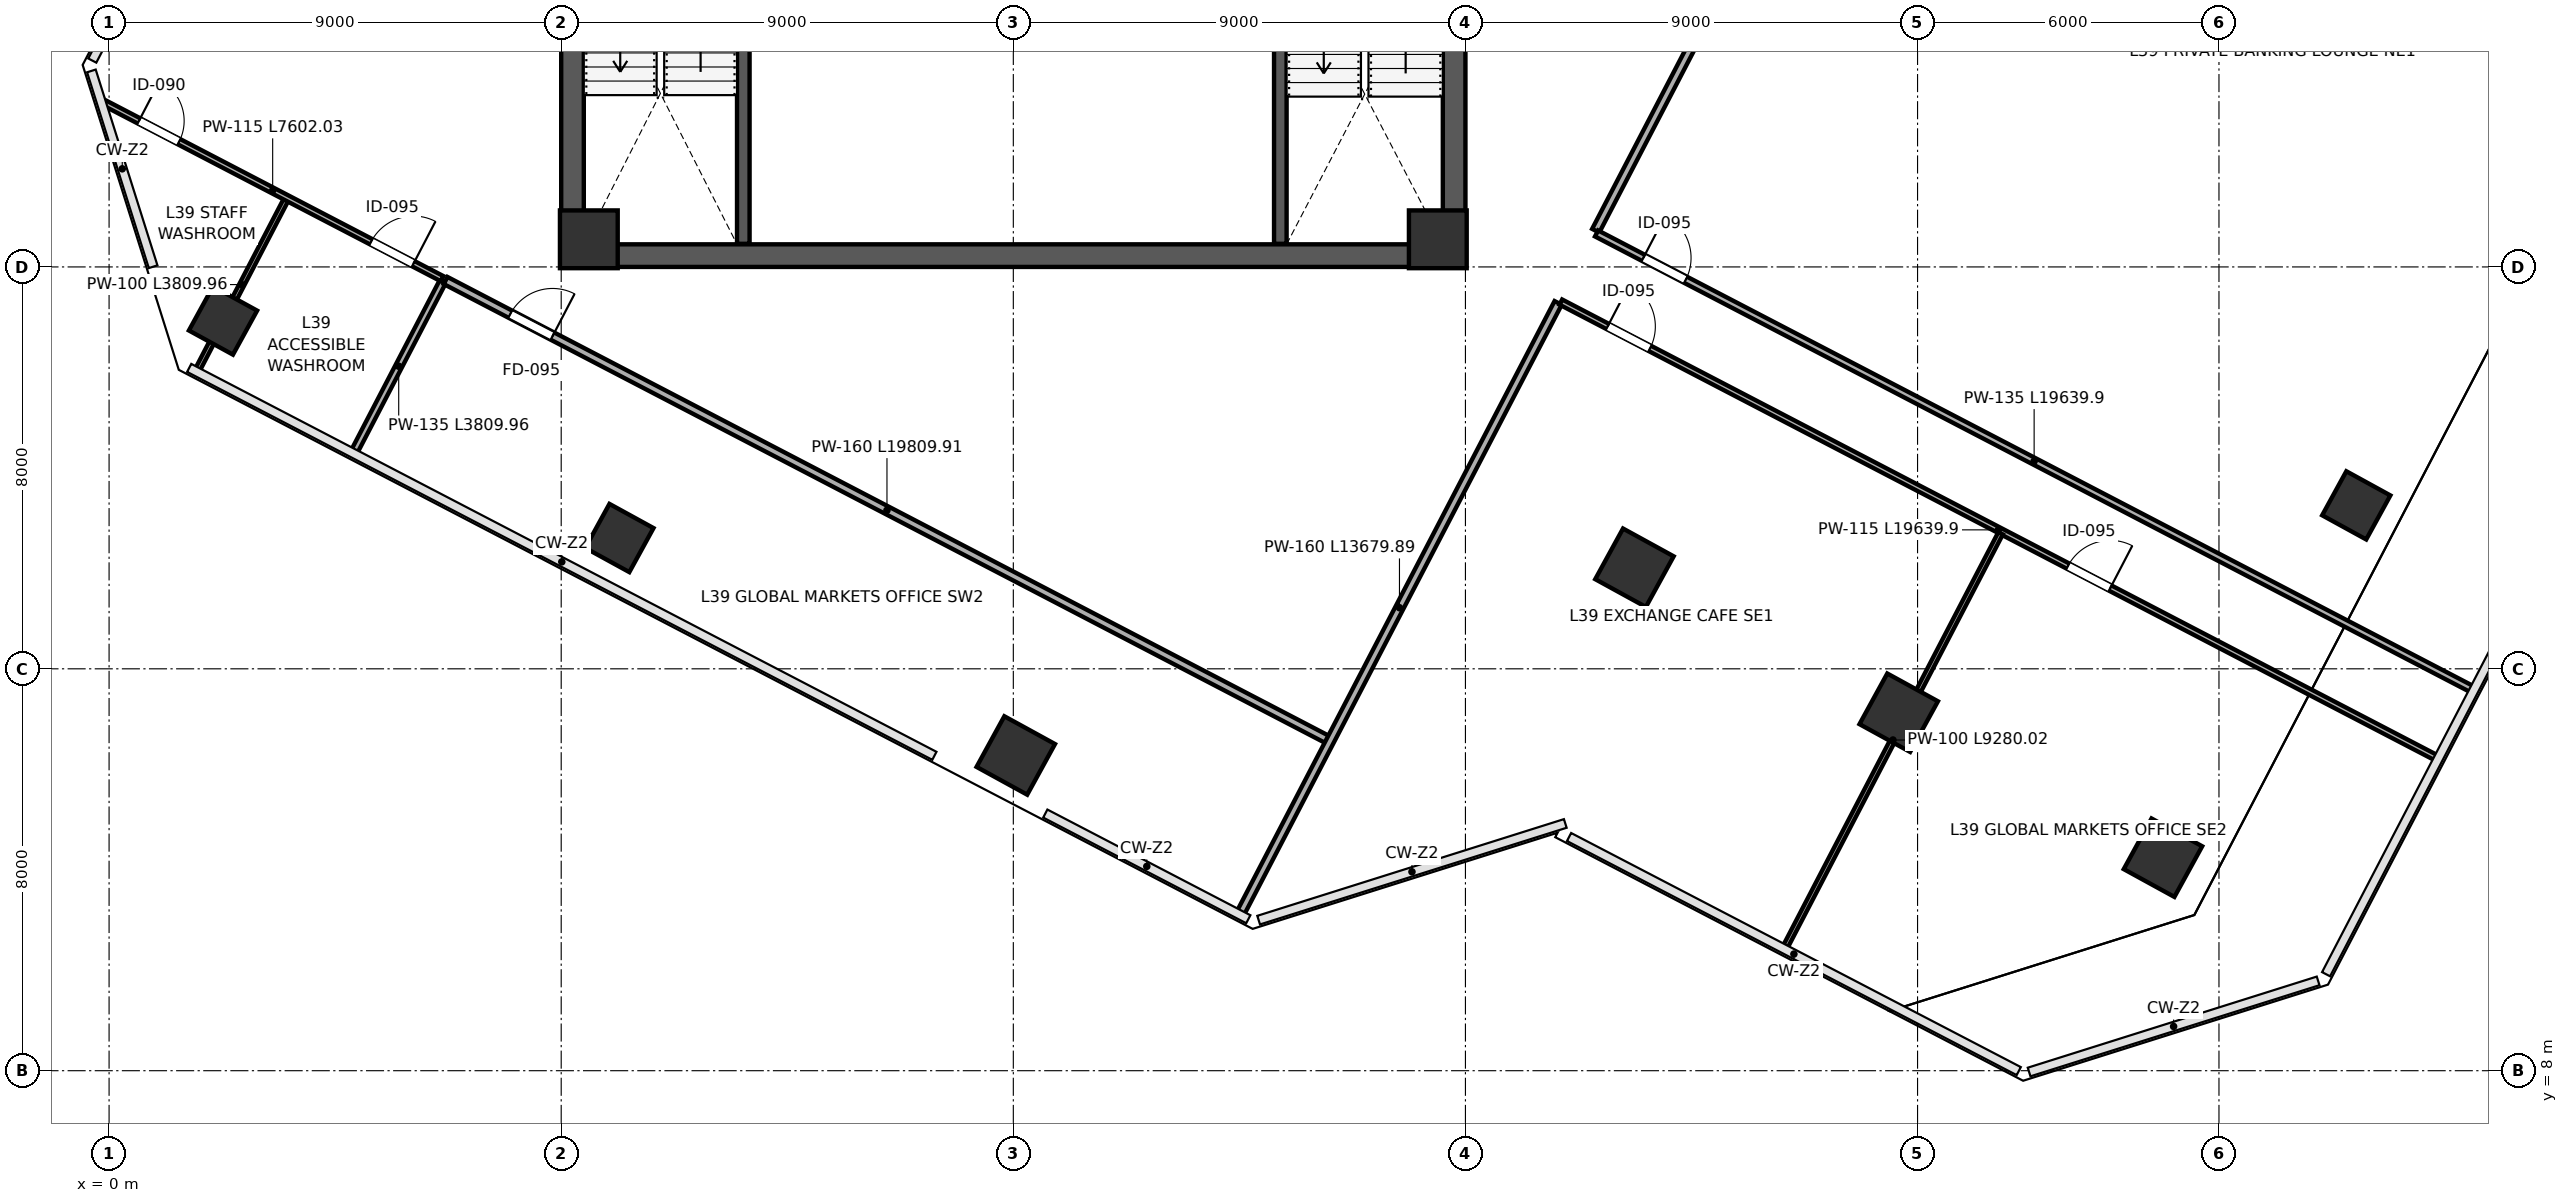
"""IFC4 building model, lengths in metres.
Left out: names, types, materials, properties, quantities, classifications, styles, units other than length and angle.
Written with IfcOpenShell. Run it as: python <this file> out.ifc"""

import sys

from ifc_helpers import new_model, si_unit, direction, frame, frame_2d, origin, origin_2d, place, context, subcontext, project, spatial, rectangle, extrude, clip, halfspace, source, transform, mapped, element, fill, save


model = new_model("IFC4")
c1 = context("Model", 3, precision=1e-05, world=origin(), true_north=direction((0.0, 1.0)))
c2 = subcontext(c1, "Body", "Model", "MODEL_VIEW")
j1 = project(units=[si_unit("LENGTHUNIT", "METRE"), si_unit("PLANEANGLEUNIT", "RADIAN")], contexts=[c1])
p1 = place(None, origin())
s1 = spatial("IfcSite", under=j1, at=p1, CompositionType="ELEMENT")
p2 = place(p1, origin())
s2 = spatial("IfcBuilding", under=s1, at=p2, CompositionType="ELEMENT")
p3 = place(p2, frame((0.0, 0.0, 175.0)))
s3 = spatial("IfcBuildingStorey", under=s2, at=p3, CompositionType="ELEMENT", Elevation=175.0)
m1 = source(origin(), c2, "Body", "SweptSolid", [
    extrude(rectangle(XDim=1.15, YDim=1.15, at=origin_2d()), origin(), (0.0, 0.0, 1.0), 4.198),
])
for number, where, z_axis, x_axis in (
    (1, (9.55, 24.55, 0.001), (0.0, 0.0, 1.0), (1.0, 0.0, 0.0)),
    (2, (26.45, 24.55, 0.001), (0.0, 0.0, 1.0), (1.0, 0.0, 0.0)),
):
    element("IfcColumn", number, at=place(p3, frame(where, z_axis=z_axis, x_axis=x_axis)), inside=s3, PredefinedType="COLUMN", context=c2, shape_type="MappedRepresentation", body=[
        mapped(m1, transform((0.0, 0.0, 0.0), scale=1.0)),
    ])
p4 = place(p3, frame((2.268, 22.933, 0.0), z_axis=(-0.045702324367, 0.099840223143, 0.993953332602), x_axis=(0.996162629473, -0.069790249582, 0.052814171435)))
e3 = element("IfcColumn", 3, at=p4, inside=s3, PredefinedType="COLUMN", context=c2, shape_type="Clipping", body=[
    clip(clip(extrude(rectangle(XDim=1.0, YDim=1.0, at=origin_2d()), origin(), (0.0, 0.0, 1.0), 4.226), halfspace(frame((0.0, 0.0, 0.076), z_axis=(0.0, 0.0, -1.0), x_axis=(1.0, 0.0, 0.0)), False)), halfspace(frame((0.0, 0.0, 4.15), z_axis=(0.0, 0.0, 1.0), x_axis=(1.0, 0.0, 0.0)), False)),
])
p5 = place(p3, frame((10.158, 18.604, 0.0), z_axis=(-0.068656550624, 0.059452173264, 0.995867319049), x_axis=(0.936025250546, 0.349211237631, 0.043683427664)))
e4 = element("IfcColumn", 4, at=p5, inside=s3, PredefinedType="COLUMN", context=c2, shape_type="Clipping", body=[
    clip(clip(extrude(rectangle(XDim=1.0, YDim=1.0, at=origin_2d()), origin(), (0.0, 0.0, 1.0), 4.217), halfspace(frame((0.0, 0.0, 0.062), z_axis=(0.0, 0.0, -1.0), x_axis=(1.0, 0.0, 0.0)), False)), halfspace(frame((0.0, 0.0, 4.155), z_axis=(0.0, 0.0, 1.0), x_axis=(1.0, 0.0, 0.0)), False)),
])
p6 = place(p3, frame((18.049, 14.275, 0.0), z_axis=(-0.091500617733, 0.018867300051, 0.995626266198), x_axis=(0.646073035963, 0.761951658232, 0.044936652286)))
e5 = element("IfcColumn", 5, at=p6, inside=s3, PredefinedType="COLUMN", context=c2, shape_type="Clipping", body=[
    clip(clip(extrude(rectangle(XDim=1.15, YDim=1.15, at=origin_2d()), origin(), (0.0, 0.0, 1.0), 4.219), halfspace(frame((0.0, 0.0, 0.074), z_axis=(0.0, 0.0, -1.0), x_axis=(1.0, 0.0, 0.0)), False)), halfspace(frame((0.0, 0.0, 4.145), z_axis=(0.0, 0.0, 1.0), x_axis=(1.0, 0.0, 0.0)), False)),
])
p7 = place(p3, frame((30.365, 18.012, 0.0), z_axis=(-0.072857964063, -0.045058422926, 0.996323971204), x_axis=(-0.05356759986, 0.997713755824, 0.041204049376)))
e6 = element("IfcColumn", 6, at=p7, inside=s3, PredefinedType="COLUMN", context=c2, shape_type="Clipping", body=[
    clip(clip(extrude(rectangle(XDim=1.15, YDim=1.15, at=origin_2d()), origin(), (0.0, 0.0, 1.0), 4.215), halfspace(frame((0.0, 0.0, 0.068), z_axis=(0.0, 0.0, -1.0), x_axis=(1.0, 0.0, 0.0)), False)), halfspace(frame((0.0, 0.0, 4.147), z_axis=(0.0, 0.0, 1.0), x_axis=(1.0, 0.0, 0.0)), False)),
])
p8 = place(p3, frame((35.625, 15.126, 0.0), z_axis=(-0.08790022673, -0.071960369583, 0.993526675711), x_axis=(-0.185602299854, 0.98110461781, 0.054639868245)))
e7 = element("IfcColumn", 7, at=p8, inside=s3, PredefinedType="COLUMN", context=c2, shape_type="Clipping", body=[
    clip(clip(extrude(rectangle(XDim=1.15, YDim=1.15, at=origin_2d()), origin(), (0.0, 0.0, 1.0), 4.227), halfspace(frame((0.0, 0.0, 0.09), z_axis=(0.0, 0.0, -1.0), x_axis=(1.0, 0.0, 0.0)), False)), halfspace(frame((0.0, 0.0, 4.137), z_axis=(0.0, 0.0, 1.0), x_axis=(1.0, 0.0, 0.0)), False)),
])
p9 = place(p3, frame((40.885, 12.24, 0.0), z_axis=(-0.102647428215, -0.098562244693, 0.989822706045), x_axis=(-0.263814321847, 0.962141844179, 0.068447609656)))
e8 = element("IfcColumn", 8, at=p9, inside=s3, PredefinedType="COLUMN", context=c2, shape_type="Clipping", body=[
    clip(clip(extrude(rectangle(XDim=1.15, YDim=1.15, at=origin_2d()), origin(), (0.0, 0.0, 1.0), 4.243), halfspace(frame((0.0, 0.0, 0.113), z_axis=(0.0, 0.0, -1.0), x_axis=(1.0, 0.0, 0.0)), False)), halfspace(frame((0.0, 0.0, 4.13), z_axis=(0.0, 0.0, 1.0), x_axis=(1.0, 0.0, 0.0)), False)),
])
p10 = place(p3, frame((44.733, 19.254, 0.0), z_axis=(-0.066915065286, -0.118857740749, 0.99065393125), x_axis=(-0.530216325585, 0.845320310072, 0.065606565695)))
e9 = element("IfcColumn", 9, at=p10, inside=s3, PredefinedType="COLUMN", context=c2, shape_type="Clipping", body=[
    clip(clip(extrude(rectangle(XDim=1.0, YDim=1.0, at=origin_2d()), origin(), (0.0, 0.0, 1.0), 4.24), halfspace(frame((0.0, 0.0, 0.094), z_axis=(0.0, 0.0, -1.0), x_axis=(1.0, 0.0, 0.0)), False)), halfspace(frame((0.0, 0.0, 4.145), z_axis=(0.0, 0.0, 1.0), x_axis=(1.0, 0.0, 0.0)), False)),
])
p11 = place(p3, frame((9.225, 24.45, 0.0), z_axis=(0.0, 0.0, 1.0), x_axis=(0.0, 1.0, 0.0)))
e10 = element("IfcWall", 10, at=p11, inside=s3, PredefinedType="SHEAR", context=c2, shape_type="SweptSolid", body=[
    extrude(rectangle(XDim=15.1, YDim=0.45, at=frame_2d((7.55, 0.0))), origin(), (0.0, 0.0, 1.0), 3.96),
])
p12 = place(p3, frame((26.775, 24.45, 0.0), z_axis=(0.0, 0.0, 1.0), x_axis=(0.0, 1.0, 0.0)))
e11 = element("IfcWall", 11, at=p12, inside=s3, PredefinedType="SHEAR", context=c2, shape_type="SweptSolid", body=[
    extrude(rectangle(XDim=15.1, YDim=0.45, at=frame_2d((7.55, 0.0))), origin(), (0.0, 0.0, 1.0), 3.96),
])
p13 = place(p12, frame((8.6, 0.0, 0.0)))
e12 = element("IfcOpeningElement", 12, at=p13, cuts=e11, PredefinedType="OPENING", context=c2, shape_type="SweptSolid", body=[
    extrude(rectangle(XDim=1.15, YDim=2.2, at=frame_2d((0.575, 1.1))), frame((0.0, 0.235, 0.0), z_axis=(0.0, -1.0, 0.0), x_axis=(1.0, 0.0, 0.0)), (0.0, 0.0, 1.0), 0.47),
])
p14 = place(p3, frame((9.0, 24.225, 0.0), z_axis=(0.0, 0.0, 1.0), x_axis=(1.0, 0.0, 0.0)))
e13 = element("IfcWall", 13, at=p14, inside=s3, PredefinedType="SHEAR", context=c2, shape_type="SweptSolid", body=[
    extrude(rectangle(XDim=18.0, YDim=0.45, at=frame_2d((9.0, 0.0))), origin(), (0.0, 0.0, 1.0), 3.96),
])
p15 = place(p3, frame((12.625, 24.46, 0.0), z_axis=(0.0, 0.0, 1.0), x_axis=(0.0, 1.0, 0.0)))
e14 = element("IfcWall", 14, at=p15, inside=s3, PredefinedType="SHEAR", context=c2, shape_type="SweptSolid", body=[
    extrude(rectangle(XDim=7.49, YDim=0.25, at=frame_2d((3.745, 0.0))), origin(), (0.0, 0.0, 1.0), 3.96),
])
p16 = place(p15, frame((5.85, 0.0, 0.0)))
e15 = element("IfcOpeningElement", 15, at=p16, cuts=e14, PredefinedType="OPENING", context=c2, shape_type="SweptSolid", body=[
    extrude(rectangle(XDim=1.15, YDim=2.2, at=frame_2d((0.575, 1.1))), frame((0.0, 0.135, 0.0), z_axis=(0.0, -1.0, 0.0), x_axis=(1.0, 0.0, 0.0)), (0.0, 0.0, 1.0), 0.27),
])
p17 = place(p3, frame((23.315, 24.46, 0.0), z_axis=(0.0, 0.0, 1.0), x_axis=(0.0, 1.0, 0.0)))
e16 = element("IfcWall", 16, at=p17, inside=s3, PredefinedType="SHEAR", context=c2, shape_type="SweptSolid", body=[
    extrude(rectangle(XDim=7.49, YDim=0.25, at=frame_2d((3.745, 0.0))), origin(), (0.0, 0.0, 1.0), 3.96),
])
p18 = place(p3, frame((1.763, 21.959, 0.0), z_axis=(0.0, 0.0, 1.0), x_axis=(0.461738042158, 0.887016336053, 0.0)))
e17 = element("IfcWall", 17, at=p18, inside=s3, PredefinedType="PARTITIONING", context=c2, shape_type="SweptSolid", body=[
    extrude(rectangle(XDim=3.81, YDim=0.1, at=frame_2d((1.905, 0.0))), origin(), (0.0, 0.0, 1.0), 3.195),
])
p19 = place(p3, frame((4.886, 20.333, 0.0), z_axis=(0.0, 0.0, 1.0), x_axis=(0.461764287366, 0.887002673566, 0.0)))
e18 = element("IfcWall", 18, at=p19, inside=s3, PredefinedType="PARTITIONING", context=c2, shape_type="SweptSolid", body=[
    extrude(rectangle(XDim=3.81, YDim=0.135, at=frame_2d((1.905, 0.0))), origin(), (0.0, 0.0, 1.0), 3.195),
])
p20 = place(p3, frame((-0.115, 27.277, 0.0), z_axis=(0.0, 0.0, 1.0), x_axis=(0.887004800346, -0.461760202012, 0.0)))
e19 = element("IfcWall", 19, at=p20, inside=s3, PredefinedType="PARTITIONING", context=c2, shape_type="SweptSolid", body=[
    extrude(rectangle(XDim=7.602, YDim=0.115, at=frame_2d((3.801, 0.0))), origin(), (0.0, 0.0, 1.0), 3.96),
])
p21 = place(p20, frame((0.8, 0.0, 0.0)))
e20 = element("IfcOpeningElement", 20, at=p21, cuts=e19, PredefinedType="OPENING", context=c2, shape_type="SweptSolid", body=[
    extrude(rectangle(XDim=0.9, YDim=2.15, at=frame_2d((0.45, 1.075))), frame((0.0, 0.067, 0.0), z_axis=(0.0, -1.0, 0.0), x_axis=(1.0, 0.0, 0.0)), (0.0, 0.0, 1.0), 0.135),
])
p22 = place(p20, frame((6.01, 0.0, 0.0)))
e21 = element("IfcOpeningElement", 21, at=p22, cuts=e19, PredefinedType="OPENING", context=c2, shape_type="SweptSolid", body=[
    extrude(rectangle(XDim=0.95, YDim=2.15, at=frame_2d((0.475, 1.075))), frame((0.0, 0.067, 0.0), z_axis=(0.0, -1.0, 0.0), x_axis=(1.0, 0.0, 0.0)), (0.0, 0.0, 1.0), 0.135),
])
p23 = place(p3, frame((6.699, 23.73, 0.0), z_axis=(0.0, 0.0, 1.0), x_axis=(0.887009683963, -0.46175082085, 0.0)))
e22 = element("IfcWall", 22, at=p23, inside=s3, PredefinedType="PARTITIONING", context=c2, shape_type="SweptSolid", body=[
    extrude(rectangle(XDim=19.81, YDim=0.16, at=frame_2d((9.905, 0.0))), origin(), (0.0, 0.0, 1.0), 3.96),
])
p24 = place(p23, frame((1.45, 0.0, 0.0)))
e23 = element("IfcOpeningElement", 23, at=p24, cuts=e22, PredefinedType="OPENING", context=c2, shape_type="SweptSolid", body=[
    extrude(rectangle(XDim=0.95, YDim=2.15, at=frame_2d((0.475, 1.075))), frame((0.0, 0.09, 0.0), z_axis=(0.0, -1.0, 0.0), x_axis=(1.0, 0.0, 0.0)), (0.0, 0.0, 1.0), 0.18),
])
p25 = place(p3, frame((29.593, 24.72, 0.0), z_axis=(0.0, 0.0, 1.0), x_axis=(0.461745249096, 0.88701258443, 0.0)))
e24 = element("IfcWall", 24, at=p25, inside=s3, PredefinedType="PARTITIONING", context=c2, shape_type="SweptSolid", body=[
    extrude(rectangle(XDim=18.74, YDim=0.16, at=frame_2d((9.37, 0.0))), origin(), (0.0, 0.0, 1.0), 3.195),
])
p26 = place(p3, frame((22.528, 11.149, 0.0), z_axis=(0.0, 0.0, 1.0), x_axis=(0.461766825398, 0.887001352289, 0.0)))
e25 = element("IfcWall", 25, at=p26, inside=s3, PredefinedType="PARTITIONING", context=c2, shape_type="SweptSolid", body=[
    extrude(rectangle(XDim=13.68, YDim=0.16, at=frame_2d((6.84, 0.0))), origin(), (0.0, 0.0, 1.0), 3.96),
])
p27 = place(p3, frame((29.61, 24.667, 0.0), z_axis=(0.0, 0.0, 1.0), x_axis=(0.887013798673, -0.461742916527, 0.0)))
e26 = element("IfcWall", 26, at=p27, inside=s3, PredefinedType="PARTITIONING", context=c2, shape_type="SweptSolid", body=[
    extrude(rectangle(XDim=19.64, YDim=0.135, at=frame_2d((9.82, 0.0))), origin(), (0.0, 0.0, 1.0), 3.96),
])
p28 = place(p27, frame((1.05, 0.0, 0.0)))
e27 = element("IfcOpeningElement", 27, at=p28, cuts=e26, PredefinedType="OPENING", context=c2, shape_type="SweptSolid", body=[
    extrude(rectangle(XDim=0.95, YDim=2.15, at=frame_2d((0.475, 1.075))), frame((0.0, 0.078, 0.0), z_axis=(0.0, -1.0, 0.0), x_axis=(1.0, 0.0, 0.0)), (0.0, 0.0, 1.0), 0.155),
])
p29 = place(p3, frame((28.899, 23.301, 0.0), z_axis=(0.0, 0.0, 1.0), x_axis=(0.887006056854, -0.461757788353, 0.0)))
e28 = element("IfcWall", 28, at=p29, inside=s3, PredefinedType="PARTITIONING", context=c2, shape_type="SweptSolid", body=[
    extrude(rectangle(XDim=19.64, YDim=0.115, at=frame_2d((9.82, 0.0))), origin(), (0.0, 0.0, 1.0), 3.96),
])
p30 = place(p29, frame((1.05, 0.0, 0.0)))
e29 = element("IfcOpeningElement", 29, at=p30, cuts=e28, PredefinedType="OPENING", context=c2, shape_type="SweptSolid", body=[
    extrude(rectangle(XDim=0.95, YDim=2.15, at=frame_2d((0.475, 1.075))), frame((0.0, 0.067, 0.0), z_axis=(0.0, -1.0, 0.0), x_axis=(1.0, 0.0, 0.0)), (0.0, 0.0, 1.0), 0.135),
])
p31 = place(p29, frame((11.38, 0.0, 0.0)))
e30 = element("IfcOpeningElement", 30, at=p31, cuts=e28, PredefinedType="OPENING", context=c2, shape_type="SweptSolid", body=[
    extrude(rectangle(XDim=0.95, YDim=2.15, at=frame_2d((0.475, 1.075))), frame((0.0, 0.067, 0.0), z_axis=(0.0, -1.0, 0.0), x_axis=(1.0, 0.0, 0.0)), (0.0, 0.0, 1.0), 0.135),
])
p32 = place(p3, frame((33.368, 10.467, 0.0), z_axis=(0.0, 0.0, 1.0), x_axis=(0.461728758034, 0.887021168859, 0.0)))
e31 = element("IfcWall", 31, at=p32, inside=s3, PredefinedType="PARTITIONING", context=c2, shape_type="SweptSolid", body=[
    extrude(rectangle(XDim=9.28, YDim=0.1, at=frame_2d((4.64, 0.0))), origin(), (0.0, 0.0, 1.0), 3.96),
])
m2 = source(origin(), c2, "Body", "SweptSolid", [
    extrude(rectangle(XDim=0.9, YDim=2.15, at=frame_2d((0.45, 1.075))), frame((0.0, 0.025, 0.0), z_axis=(0.0, -1.0, 0.0), x_axis=(1.0, 0.0, 0.0)), (0.0, 0.0, 1.0), 0.05),
])
p33 = place(p21, origin())
e32 = element("IfcDoor", 32, at=p33, inside=s3, OperationType="SINGLE_SWING_LEFT", PredefinedType="DOOR", context=c2, shape_type="MappedRepresentation", body=[
    mapped(m2, transform((0.0, 0.0, 0.0), scale=1.0)),
])
fill(e20, e32)
m3 = source(origin(), c2, "Body", "SweptSolid", [
    extrude(rectangle(XDim=0.95, YDim=2.15, at=frame_2d((0.475, 1.075))), frame((0.0, 0.025, 0.0), z_axis=(0.0, -1.0, 0.0), x_axis=(1.0, 0.0, 0.0)), (0.0, 0.0, 1.0), 0.05),
])
p34 = place(p22, origin())
e33 = element("IfcDoor", 33, at=p34, inside=s3, OperationType="SINGLE_SWING_RIGHT", PredefinedType="DOOR", context=c2, shape_type="MappedRepresentation", body=[
    mapped(m3, transform((0.0, 0.0, 0.0), scale=1.0)),
])
fill(e21, e33)
m4 = source(origin(), c2, "Body", "SweptSolid", [
    extrude(rectangle(XDim=0.95, YDim=2.15, at=frame_2d((0.475, 1.075))), frame((0.0, 0.025, 0.0), z_axis=(0.0, -1.0, 0.0), x_axis=(1.0, 0.0, 0.0)), (0.0, 0.0, 1.0), 0.05),
])
p35 = place(p24, origin())
e34 = element("IfcDoor", 34, at=p35, inside=s3, OperationType="SINGLE_SWING_RIGHT", PredefinedType="DOOR", context=c2, shape_type="MappedRepresentation", body=[
    mapped(m4, transform((0.0, 0.0, 0.0), scale=1.0)),
])
fill(e23, e34)
p36 = place(p28, origin())
e35 = element("IfcDoor", 35, at=p36, inside=s3, OperationType="SINGLE_SWING_LEFT", PredefinedType="DOOR", context=c2, shape_type="MappedRepresentation", body=[
    mapped(m3, transform((0.0, 0.0, 0.0), scale=1.0)),
])
fill(e27, e35)
p37 = place(p30, origin())
e36 = element("IfcDoor", 36, at=p37, inside=s3, OperationType="SINGLE_SWING_LEFT", PredefinedType="DOOR", context=c2, shape_type="MappedRepresentation", body=[
    mapped(m3, transform((0.0, 0.0, 0.0), scale=1.0)),
])
fill(e29, e36)
p38 = place(p31, origin())
e37 = element("IfcDoor", 37, at=p38, inside=s3, OperationType="SINGLE_SWING_RIGHT", PredefinedType="DOOR", context=c2, shape_type="MappedRepresentation", body=[
    mapped(m3, transform((0.0, 0.0, 0.0), scale=1.0)),
])
fill(e30, e37)
save(model, sys.argv[1])
